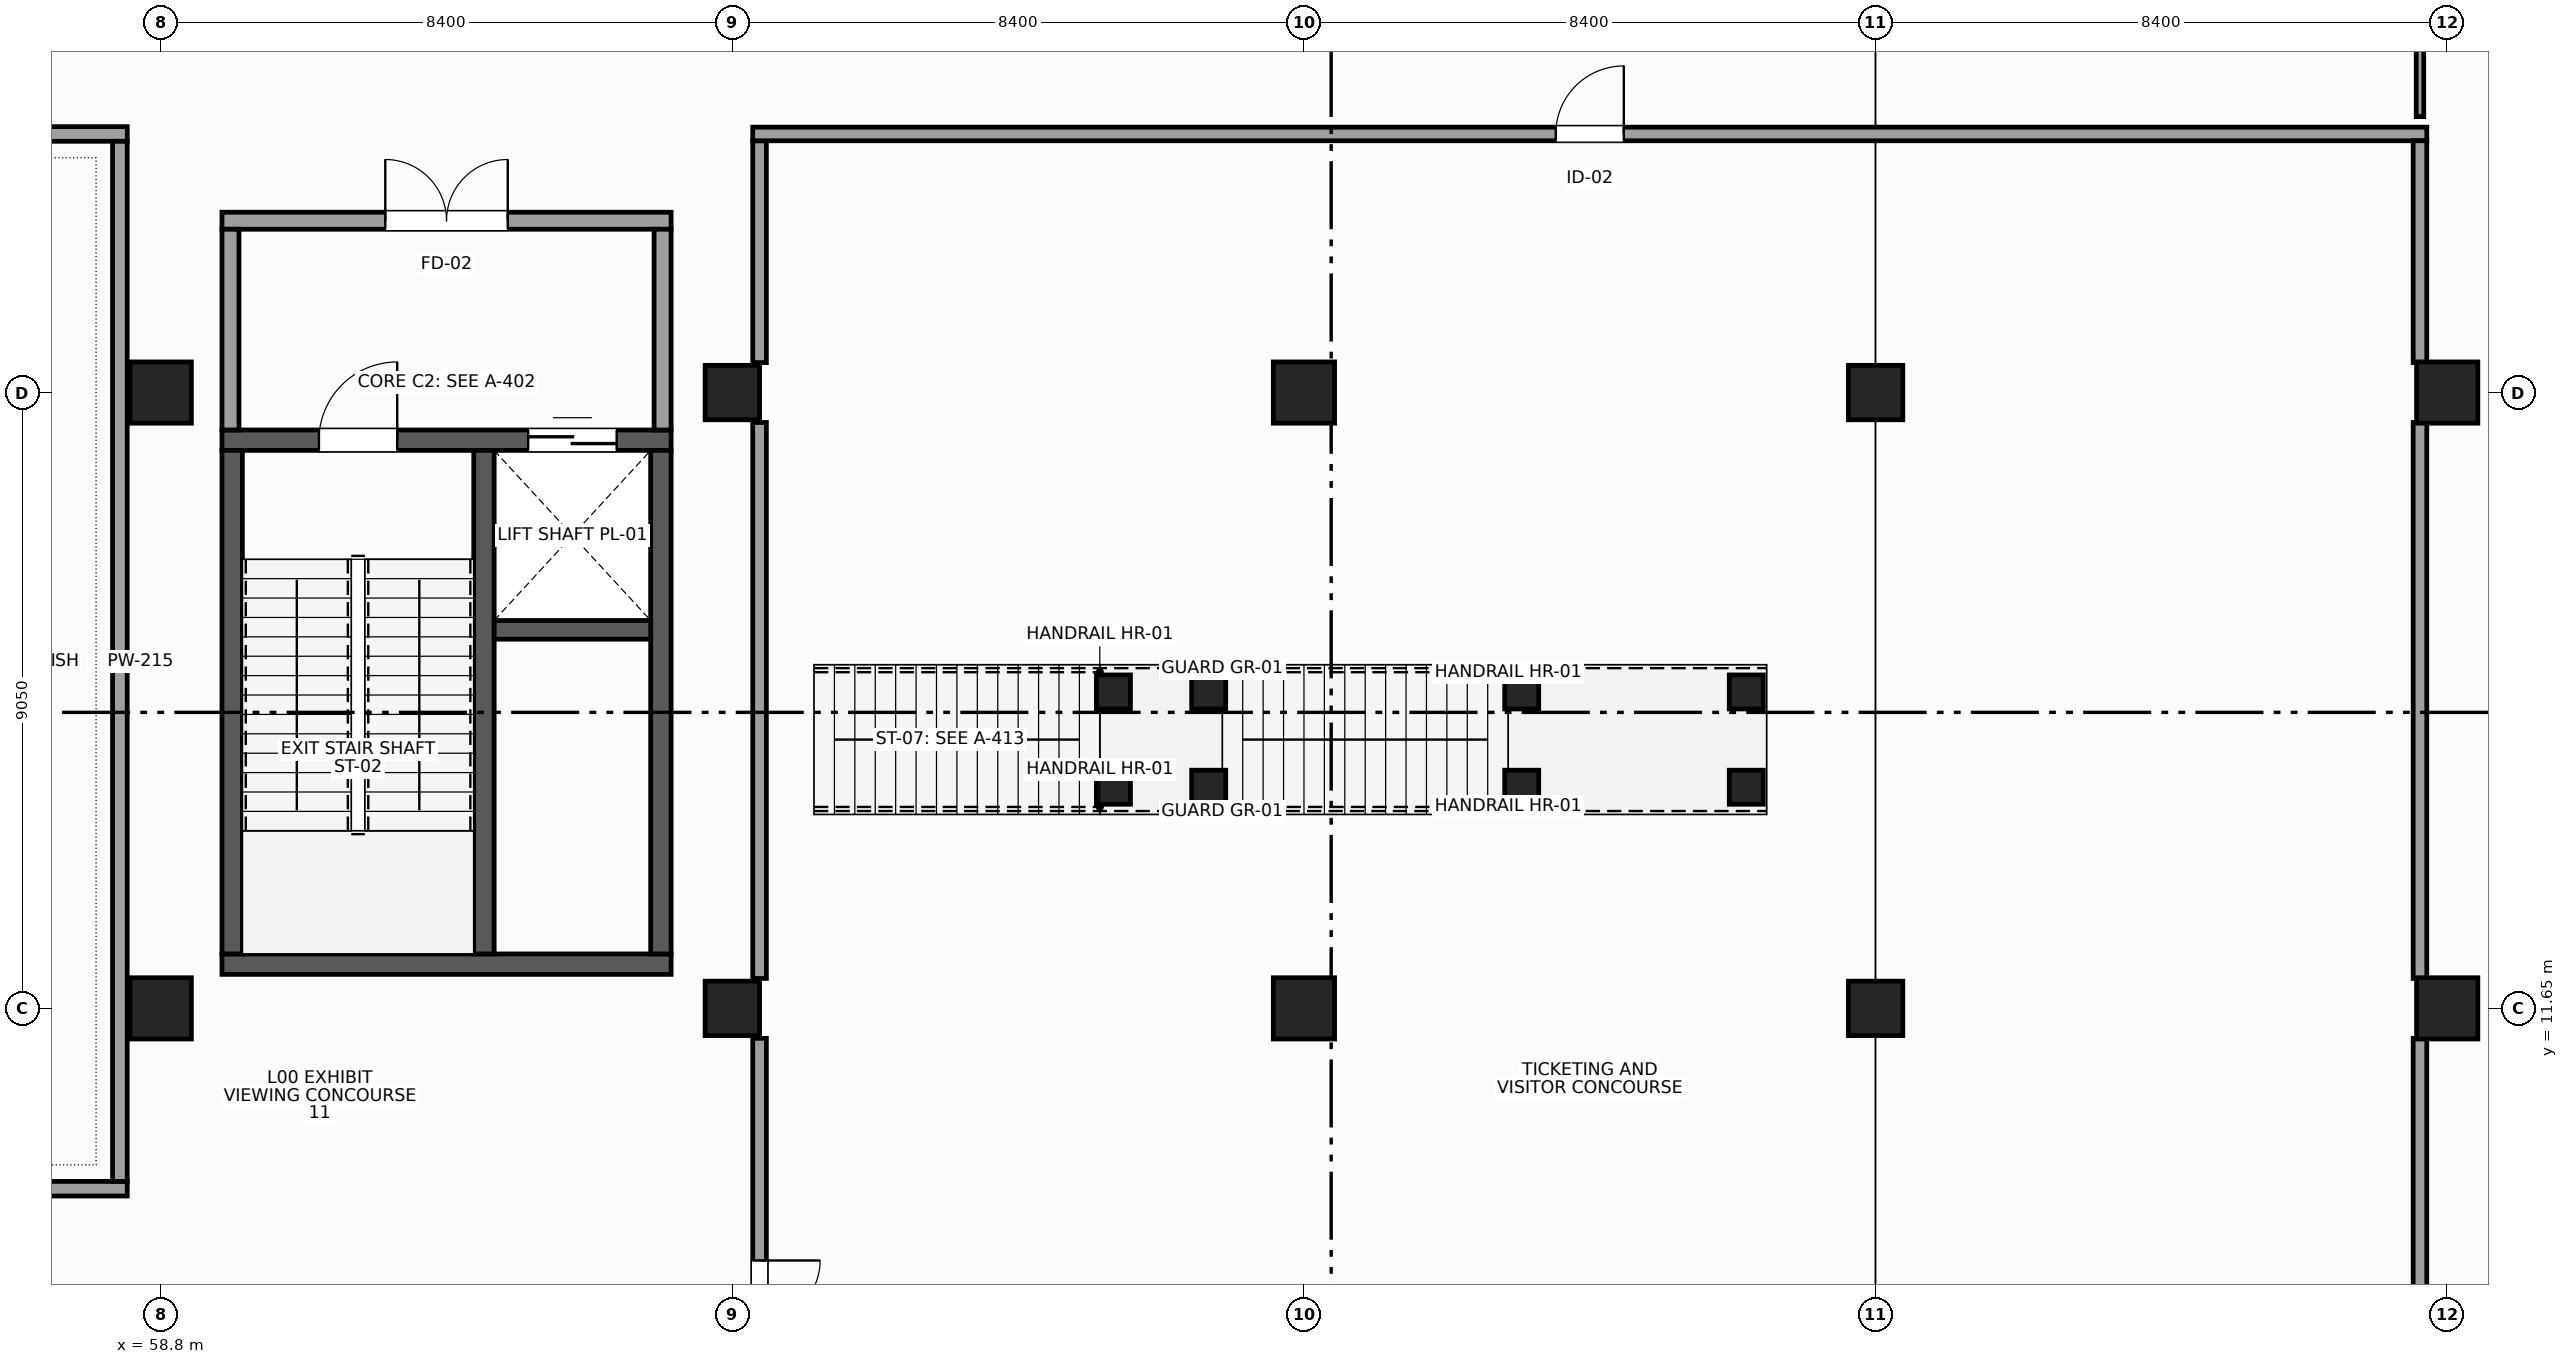
"""IFC4 building model, lengths in metres.
Left out: names, types, materials, properties, quantities, classifications, styles, units other than length and angle.
Written with IfcOpenShell. Run it as: python <this file> out.ifc"""

import sys

from ifc_helpers import new_model, si_unit, direction, frame, frame_2d, origin, origin_2d, place, context, subcontext, project, spatial, rectangle, extrude, element, fill, save


model = new_model("IFC4")
c1 = context("Model", 3, precision=1e-05, world=origin(), true_north=direction((0.0, 1.0)))
c2 = subcontext(c1, "Body", "Model", "MODEL_VIEW")
j1 = project(units=[si_unit("LENGTHUNIT", "METRE"), si_unit("PLANEANGLEUNIT", "RADIAN")], contexts=[c1])
p1 = place(None, origin())
s1 = spatial("IfcSite", under=j1, at=p1, CompositionType="ELEMENT")
p2 = place(p1, origin())
s2 = spatial("IfcBuilding", under=s1, at=p2, CompositionType="ELEMENT")
p3 = place(p2, origin())
s3 = spatial("IfcBuildingStorey", under=s2, at=p3, CompositionType="ELEMENT", Elevation=0.0)
for number, where, z_axis, x_axis in (
    (1, (58.8, 11.65, 0.0), (0.0, 0.0, 1.0), (1.0, 0.0, 0.0)),
    (2, (58.8, 20.7, 0.0), (0.0, 0.0, 1.0), (1.0, 0.0, 0.0)),
):
    element("IfcColumn", number, at=place(p3, frame(where, z_axis=z_axis, x_axis=x_axis)), inside=s3, PredefinedType="COLUMN", context=c2, shape_type="SweptSolid", body=[
        extrude(rectangle(XDim=0.9, YDim=0.9, at=origin_2d()), origin(), (0.0, 0.0, 1.0), 5.4),
    ])
for number, where, z_axis, x_axis in (
    (3, (67.2, 11.65, 0.0), (0.0, 0.0, 1.0), (1.0, 0.0, 0.0)),
    (4, (67.2, 20.7, 0.0), (0.0, 0.0, 1.0), (1.0, 0.0, 0.0)),
):
    element("IfcColumn", number, at=place(p3, frame(where, z_axis=z_axis, x_axis=x_axis)), inside=s3, PredefinedType="COLUMN", context=c2, shape_type="SweptSolid", body=[
        extrude(rectangle(XDim=0.8, YDim=0.8, at=origin_2d()), origin(), (0.0, 0.0, 1.0), 5.4),
    ])
for number, where, z_axis, x_axis in (
    (5, (75.6, 11.65, 0.0), (0.0, 0.0, 1.0), (1.0, 0.0, 0.0)),
    (6, (75.6, 20.7, 0.0), (0.0, 0.0, 1.0), (1.0, 0.0, 0.0)),
):
    element("IfcColumn", number, at=place(p3, frame(where, z_axis=z_axis, x_axis=x_axis)), inside=s3, PredefinedType="COLUMN", context=c2, shape_type="SweptSolid", body=[
        extrude(rectangle(XDim=0.9, YDim=0.9, at=origin_2d()), origin(), (0.0, 0.0, 1.0), 5.4),
    ])
for number, where, z_axis, x_axis in (
    (7, (84.0, 11.65, 0.0), (0.0, 0.0, 1.0), (1.0, 0.0, 0.0)),
    (8, (84.0, 20.7, 0.0), (0.0, 0.0, 1.0), (1.0, 0.0, 0.0)),
):
    element("IfcColumn", number, at=place(p3, frame(where, z_axis=z_axis, x_axis=x_axis)), inside=s3, PredefinedType="COLUMN", context=c2, shape_type="SweptSolid", body=[
        extrude(rectangle(XDim=0.8, YDim=0.8, at=origin_2d()), origin(), (0.0, 0.0, 1.0), 5.4),
    ])
for number, where, z_axis, x_axis in (
    (9, (92.4, 11.65, 0.0), (0.0, 0.0, 1.0), (1.0, 0.0, 0.0)),
    (10, (92.4, 20.7, 0.0), (0.0, 0.0, 1.0), (1.0, 0.0, 0.0)),
):
    element("IfcColumn", number, at=place(p3, frame(where, z_axis=z_axis, x_axis=x_axis)), inside=s3, PredefinedType="COLUMN", context=c2, shape_type="SweptSolid", body=[
        extrude(rectangle(XDim=0.9, YDim=0.9, at=origin_2d()), origin(), (0.0, 0.0, 1.0), 5.4),
    ])
p4 = place(p3, frame((59.7, 12.3, 0.0), z_axis=(0.0, 0.0, 1.0), x_axis=(1.0, 0.0, 0.0)))
e11 = element("IfcWall", 11, at=p4, inside=s3, PredefinedType="SHEAR", context=c2, shape_type="SweptSolid", body=[
    extrude(rectangle(XDim=6.6, YDim=0.3, at=frame_2d((3.3, 0.0))), origin(), (0.0, 0.0, 1.0), 5.09),
])
p5 = place(p3, frame((59.7, 20.0, 0.0), z_axis=(0.0, 0.0, 1.0), x_axis=(1.0, 0.0, 0.0)))
e12 = element("IfcWall", 12, at=p5, inside=s3, PredefinedType="SHEAR", context=c2, shape_type="SweptSolid", body=[
    extrude(rectangle(XDim=6.6, YDim=0.3, at=frame_2d((3.3, 0.0))), origin(), (0.0, 0.0, 1.0), 5.09),
])
p6 = place(p5, frame((1.425, 0.0, 0.0)))
e13 = element("IfcOpeningElement", 13, at=p6, cuts=e12, PredefinedType="OPENING", context=c2, shape_type="SweptSolid", body=[
    extrude(rectangle(XDim=1.15, YDim=2.2, at=frame_2d((0.575, 1.1))), frame((0.0, 0.16, 0.0), z_axis=(0.0, -1.0, 0.0), x_axis=(1.0, 0.0, 0.0)), (0.0, 0.0, 1.0), 0.32),
])
p7 = place(p5, frame((4.5, 0.0, 0.0)))
e14 = element("IfcOpeningElement", 14, at=p7, cuts=e12, PredefinedType="OPENING", context=c2, shape_type="SweptSolid", body=[
    extrude(rectangle(XDim=1.3, YDim=2.2, at=frame_2d((0.65, 1.1))), frame((0.0, 0.16, 0.0), z_axis=(0.0, -1.0, 0.0), x_axis=(1.0, 0.0, 0.0)), (0.0, 0.0, 1.0), 0.32),
])
for number, where, z_axis, x_axis in (
    (15, (59.85, 12.45, 0.0), (0.0, 0.0, 1.0), (0.0, 1.0, 0.0)),
    (16, (66.15, 12.45, 0.0), (0.0, 0.0, 1.0), (0.0, 1.0, 0.0)),
    (17, (63.55, 12.45, 0.0), (0.0, 0.0, 1.0), (0.0, 1.0, 0.0)),
):
    element("IfcWall", number, at=place(p3, frame(where, z_axis=z_axis, x_axis=x_axis)), inside=s3, PredefinedType="SHEAR", context=c2, shape_type="SweptSolid", body=[
        extrude(rectangle(XDim=7.4, YDim=0.3, at=frame_2d((3.7, 0.0))), origin(), (0.0, 0.0, 1.0), 5.09),
    ])
p8 = place(p3, frame((63.7, 17.213, 0.0), z_axis=(0.0, 0.0, 1.0), x_axis=(1.0, 0.0, 0.0)))
e18 = element("IfcWall", 18, at=p8, inside=s3, PredefinedType="SHEAR", context=c2, shape_type="SweptSolid", body=[
    extrude(rectangle(XDim=2.3, YDim=0.275, at=frame_2d((1.15, 0.0))), origin(), (0.0, 0.0, 1.0), 5.09),
])
p9 = place(p3, frame((59.7, 23.225, 0.0), z_axis=(0.0, 0.0, 1.0), x_axis=(1.0, 0.0, 0.0)))
e19 = element("IfcWall", 19, at=p9, inside=s3, PredefinedType="PARTITIONING", context=c2, shape_type="SweptSolid", body=[
    extrude(rectangle(XDim=6.6, YDim=0.25, at=frame_2d((3.3, 0.0))), origin(), (0.0, 0.0, 1.0), 5.09),
])
p10 = place(p9, frame((2.4, 0.0, 0.0)))
e20 = element("IfcOpeningElement", 20, at=p10, cuts=e19, PredefinedType="OPENING", context=c2, shape_type="SweptSolid", body=[
    extrude(rectangle(XDim=1.8, YDim=2.25, at=frame_2d((0.9, 1.125))), frame((0.0, 0.135, 0.0), z_axis=(0.0, -1.0, 0.0), x_axis=(1.0, 0.0, 0.0)), (0.0, 0.0, 1.0), 0.27),
])
for number, where, z_axis, x_axis in (
    (21, (59.825, 20.15, 0.0), (0.0, 0.0, 1.0), (0.0, 1.0, 0.0)),
    (22, (66.175, 20.15, 0.0), (0.0, 0.0, 1.0), (0.0, 1.0, 0.0)),
):
    element("IfcWall", number, at=place(p3, frame(where, z_axis=z_axis, x_axis=x_axis)), inside=s3, PredefinedType="PARTITIONING", context=c2, shape_type="SweptSolid", body=[
        extrude(rectangle(XDim=2.95, YDim=0.25, at=frame_2d((1.475, 0.0))), origin(), (0.0, 0.0, 1.0), 4.23),
    ])
for number, where, z_axis, x_axis in (
    (23, (72.8, 14.9, 0.0), (0.0, 0.0, 1.0), (1.0, 0.0, 0.0)),
    (24, (72.8, 16.3, 0.0), (0.0, 0.0, 1.0), (1.0, 0.0, 0.0)),
    (25, (74.2, 14.9, 0.0), (0.0, 0.0, 1.0), (1.0, 0.0, 0.0)),
    (26, (74.2, 16.3, 0.0), (0.0, 0.0, 1.0), (1.0, 0.0, 0.0)),
):
    element("IfcColumn", number, at=place(p3, frame(where, z_axis=z_axis, x_axis=x_axis)), inside=s3, PredefinedType="COLUMN", context=c2, shape_type="SweptSolid", body=[
        extrude(rectangle(XDim=0.5, YDim=0.5, at=origin_2d()), origin(), (0.0, 0.0, 1.0), 2.4),
    ])
for number, where, z_axis, x_axis in (
    (27, (78.8, 14.9, 0.0), (0.0, 0.0, 1.0), (1.0, 0.0, 0.0)),
    (28, (78.8, 16.3, 0.0), (0.0, 0.0, 1.0), (1.0, 0.0, 0.0)),
    (29, (82.1, 14.9, 0.0), (0.0, 0.0, 1.0), (1.0, 0.0, 0.0)),
    (30, (82.1, 16.3, 0.0), (0.0, 0.0, 1.0), (1.0, 0.0, 0.0)),
):
    element("IfcColumn", number, at=place(p3, frame(where, z_axis=z_axis, x_axis=x_axis)), inside=s3, PredefinedType="COLUMN", context=c2, shape_type="SweptSolid", body=[
        extrude(rectangle(XDim=0.5, YDim=0.5, at=origin_2d()), origin(), (0.0, 0.0, 1.0), 5.1),
    ])
p11 = place(p3, frame((67.6, 2.9, 0.0), z_axis=(0.0, 0.0, 1.0), x_axis=(0.0, 1.0, 0.0)))
e31 = element("IfcWall", 31, at=p11, inside=s3, PredefinedType="PARTITIONING", context=c2, shape_type="SweptSolid", body=[
    extrude(rectangle(XDim=8.31, YDim=0.2, at=frame_2d((4.155, 0.0))), origin(), (0.0, 0.0, 1.0), 3.65),
])
p12 = place(p11, frame((3.265, 0.0, 0.0)))
e32 = element("IfcOpeningElement", 32, at=p12, cuts=e31, PredefinedType="OPENING", context=c2, shape_type="SweptSolid", body=[
    extrude(rectangle(XDim=1.78, YDim=2.38, at=frame_2d((0.89, 1.19))), frame((0.0, 0.11, 0.0), z_axis=(0.0, -1.0, 0.0), x_axis=(1.0, 0.0, 0.0)), (0.0, 0.0, 1.0), 0.22),
])
p13 = place(p3, frame((67.6, 12.09, 0.0), z_axis=(0.0, 0.0, 1.0), x_axis=(0.0, 1.0, 0.0)))
e33 = element("IfcWall", 33, at=p13, inside=s3, PredefinedType="PARTITIONING", context=c2, shape_type="SweptSolid", body=[
    extrude(rectangle(XDim=8.17, YDim=0.2, at=frame_2d((4.085, 0.0))), origin(), (0.0, 0.0, 1.0), 5.09),
])
p14 = place(p3, frame((67.6, 21.14, 0.0), z_axis=(0.0, 0.0, 1.0), x_axis=(0.0, 1.0, 0.0)))
e34 = element("IfcWall", 34, at=p14, inside=s3, PredefinedType="PARTITIONING", context=c2, shape_type="SweptSolid", body=[
    extrude(rectangle(XDim=3.26, YDim=0.2, at=frame_2d((1.63, 0.0))), origin(), (0.0, 0.0, 1.0), 4.54),
])
p15 = place(p3, frame((67.5, 24.5, 0.0), z_axis=(0.0, 0.0, 1.0), x_axis=(1.0, 0.0, 0.0)))
e35 = element("IfcWall", 35, at=p15, inside=s3, PredefinedType="PARTITIONING", context=c2, shape_type="SweptSolid", body=[
    extrude(rectangle(XDim=24.6, YDim=0.2, at=frame_2d((12.3, 0.0))), origin(), (0.0, 0.0, 1.0), 4.13),
])
p16 = place(p15, frame((11.8, 0.0, 0.0)))
e36 = element("IfcOpeningElement", 36, at=p16, cuts=e35, PredefinedType="OPENING", context=c2, shape_type="SweptSolid", body=[
    extrude(rectangle(XDim=1.0, YDim=2.15, at=frame_2d((0.5, 1.075))), frame((0.0, 0.11, 0.0), z_axis=(0.0, -1.0, 0.0), x_axis=(1.0, 0.0, 0.0)), (0.0, 0.0, 1.0), 0.22),
])
p17 = place(p3, frame((92.0, 2.9, 0.0), z_axis=(0.0, 0.0, 1.0), x_axis=(0.0, 1.0, 0.0)))
e37 = element("IfcWall", 37, at=p17, inside=s3, PredefinedType="PARTITIONING", context=c2, shape_type="SweptSolid", body=[
    extrude(rectangle(XDim=8.31, YDim=0.2, at=frame_2d((4.155, 0.0))), origin(), (0.0, 0.0, 1.0), 3.65),
])
p18 = place(p3, frame((92.0, 12.09, 0.0), z_axis=(0.0, 0.0, 1.0), x_axis=(0.0, 1.0, 0.0)))
e38 = element("IfcWall", 38, at=p18, inside=s3, PredefinedType="PARTITIONING", context=c2, shape_type="SweptSolid", body=[
    extrude(rectangle(XDim=8.17, YDim=0.2, at=frame_2d((4.085, 0.0))), origin(), (0.0, 0.0, 1.0), 4.54),
])
p19 = place(p3, frame((92.0, 21.14, 0.0), z_axis=(0.0, 0.0, 1.0), x_axis=(0.0, 1.0, 0.0)))
e39 = element("IfcWall", 39, at=p19, inside=s3, PredefinedType="PARTITIONING", context=c2, shape_type="SweptSolid", body=[
    extrude(rectangle(XDim=3.26, YDim=0.2, at=frame_2d((1.63, 0.0))), origin(), (0.0, 0.0, 1.0), 4.54),
])
p20 = place(p3, frame((42.292, 9.0, 0.0), z_axis=(0.0, 0.0, 1.0), x_axis=(1.0, 0.0, 0.0)))
e40 = element("IfcWall", 40, at=p20, inside=s3, PredefinedType="PARTITIONING", context=c2, shape_type="SweptSolid", body=[
    extrude(rectangle(XDim=16.016, YDim=0.215, at=frame_2d((8.008, 0.0))), origin(), (0.0, 0.0, 1.0), 4.14),
])
p21 = place(p20, frame((7.548, 0.0, 0.0)))
e41 = element("IfcOpeningElement", 41, at=p21, cuts=e40, PredefinedType="OPENING", context=c2, shape_type="SweptSolid", body=[
    extrude(rectangle(XDim=0.92, YDim=2.1, at=frame_2d((0.46, 1.05))), frame((0.0, 0.118, 0.0), z_axis=(0.0, -1.0, 0.0), x_axis=(1.0, 0.0, 0.0)), (0.0, 0.0, 1.0), 0.235),
])
p22 = place(p20, frame((9.068, 0.0, 1.05)))
e42 = element("IfcOpeningElement", 42, at=p22, cuts=e40, PredefinedType="OPENING", context=c2, shape_type="SweptSolid", body=[
    extrude(rectangle(XDim=2.1, YDim=1.3, at=frame_2d((1.05, 0.65))), frame((0.0, 0.118, 0.0), z_axis=(0.0, -1.0, 0.0), x_axis=(1.0, 0.0, 0.0)), (0.0, 0.0, 1.0), 0.235),
])
p23 = place(p3, frame((42.292, 24.5, 0.0), z_axis=(0.0, 0.0, 1.0), x_axis=(1.0, 0.0, 0.0)))
e43 = element("IfcWall", 43, at=p23, inside=s3, PredefinedType="PARTITIONING", context=c2, shape_type="SweptSolid", body=[
    extrude(rectangle(XDim=16.016, YDim=0.215, at=frame_2d((8.008, 0.0))), origin(), (0.0, 0.0, 1.0), 4.13),
])
p24 = place(p3, frame((58.2, 9.107, 0.0), z_axis=(0.0, 0.0, 1.0), x_axis=(0.0, 1.0, 0.0)))
e44 = element("IfcWall", 44, at=p24, inside=s3, PredefinedType="PARTITIONING", context=c2, shape_type="SweptSolid", body=[
    extrude(rectangle(XDim=15.285, YDim=0.215, at=frame_2d((7.643, 0.0))), origin(), (0.0, 0.0, 1.0), 4.23),
])
p25 = place(p3, frame((92.0, 24.755, 0.0), z_axis=(0.0, 0.0, 1.0), x_axis=(0.0, 1.0, 0.0)))
e45 = element("IfcWall", 45, at=p25, inside=s3, PredefinedType="PARTITIONING", context=c2, shape_type="SweptSolid", body=[
    extrude(rectangle(XDim=4.555, YDim=0.11, at=frame_2d((2.278, 0.0))), origin(), (0.0, 0.0, 1.0), 4.54),
])
p26 = place(p6, origin())
e46 = element("IfcDoor", 46, at=p26, inside=s3, OperationType="SINGLE_SWING_RIGHT", PredefinedType="DOOR", context=c2, shape_type="SweptSolid", body=[
    extrude(rectangle(XDim=1.15, YDim=2.2, at=frame_2d((0.575, 1.1))), frame((0.0, 0.025, 0.0), z_axis=(0.0, -1.0, 0.0), x_axis=(1.0, 0.0, 0.0)), (0.0, 0.0, 1.0), 0.05),
])
fill(e13, e46)
p27 = place(p7, origin())
e47 = element("IfcDoor", 47, at=p27, inside=s3, OperationType="DOUBLE_DOOR_SLIDING", PredefinedType="DOOR", context=c2, shape_type="SweptSolid", body=[
    extrude(rectangle(XDim=1.3, YDim=2.2, at=frame_2d((0.65, 1.1))), frame((0.0, 0.025, 0.0), z_axis=(0.0, -1.0, 0.0), x_axis=(1.0, 0.0, 0.0)), (0.0, 0.0, 1.0), 0.05),
])
fill(e14, e47)
p28 = place(p10, origin())
e48 = element("IfcDoor", 48, at=p28, inside=s3, OperationType="DOUBLE_DOOR_SINGLE_SWING", PredefinedType="DOOR", context=c2, shape_type="SweptSolid", body=[
    extrude(rectangle(XDim=1.8, YDim=2.25, at=frame_2d((0.9, 1.125))), frame((0.0, 0.025, 0.0), z_axis=(0.0, -1.0, 0.0), x_axis=(1.0, 0.0, 0.0)), (0.0, 0.0, 1.0), 0.05),
])
fill(e20, e48)
p29 = place(p12, frame((1.78, 0.0, 0.0), z_axis=(0.0, 0.0, 1.0), x_axis=(-1.0, 0.0, 0.0)))
e49 = element("IfcDoor", 49, at=p29, inside=s3, OperationType="DOUBLE_DOOR_SINGLE_SWING", PredefinedType="DOOR", context=c2, shape_type="SweptSolid", body=[
    extrude(rectangle(XDim=1.78, YDim=2.38, at=frame_2d((0.89, 1.19))), frame((0.0, 0.025, 0.0), z_axis=(0.0, -1.0, 0.0), x_axis=(1.0, 0.0, 0.0)), (0.0, 0.0, 1.0), 0.05),
])
fill(e32, e49)
p30 = place(p16, origin())
e50 = element("IfcDoor", 50, at=p30, inside=s3, OperationType="SINGLE_SWING_RIGHT", PredefinedType="DOOR", context=c2, shape_type="SweptSolid", body=[
    extrude(rectangle(XDim=1.0, YDim=2.15, at=frame_2d((0.5, 1.075))), frame((0.0, 0.025, 0.0), z_axis=(0.0, -1.0, 0.0), x_axis=(1.0, 0.0, 0.0)), (0.0, 0.0, 1.0), 0.05),
])
fill(e36, e50)
save(model, sys.argv[1])
